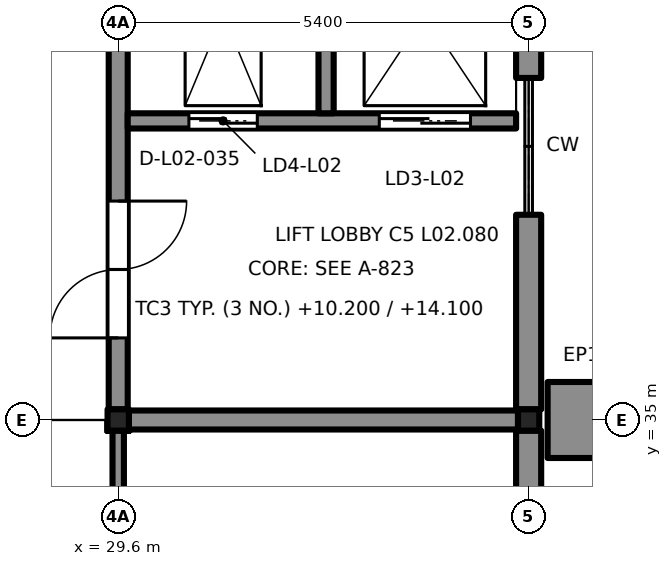
"""IFC4 building model, lengths in metres.
Left out: names, types, materials, properties, quantities, classifications, styles, units other than length and angle.
Written with IfcOpenShell. Run it as: python <this file> out.ifc"""

import sys

from ifc_helpers import new_model, si_unit, direction, frame, frame_2d, origin, origin_2d, place, context, subcontext, project, spatial, rectangle, extrude, element, fill, save


model = new_model("IFC4")
c1 = context("Model", 3, precision=1e-05, world=origin(), true_north=direction((0.0, 1.0)))
c2 = subcontext(c1, "Body", "Model", "MODEL_VIEW")
j1 = project(units=[si_unit("LENGTHUNIT", "METRE"), si_unit("PLANEANGLEUNIT", "RADIAN")], contexts=[c1])
p1 = place(None, origin())
s1 = spatial("IfcSite", under=j1, at=p1, CompositionType="ELEMENT")
p2 = place(p1, origin())
s2 = spatial("IfcBuilding", under=s1, at=p2, CompositionType="ELEMENT")
p3 = place(p2, frame((0.0, 0.0, 10.2)))
s3 = spatial("IfcBuildingStorey", under=s2, at=p3, CompositionType="ELEMENT", Elevation=10.2)
for number, where, z_axis, x_axis in (
    (1, (29.6, 35.0, 0.0), (0.0, 0.0, 1.0), (1.0, 0.0, 0.0)),
    (2, (35.0, 35.0, 0.0), (0.0, 0.0, 1.0), (1.0, 0.0, 0.0)),
):
    element("IfcColumn", number, at=place(p3, frame(where, z_axis=z_axis, x_axis=x_axis)), inside=s3, PredefinedType="COLUMN", context=c2, shape_type="SweptSolid", body=[
        extrude(rectangle(XDim=0.28, YDim=0.28, at=origin_2d()), origin(), (0.0, 0.0, 1.0), 3.9),
    ])
p4 = place(p3, frame((29.6, 35.14, 0.0), z_axis=(0.0, 0.0, 1.0), x_axis=(0.0, 1.0, 0.0)))
e3 = element("IfcWall", 3, at=p4, inside=s3, PredefinedType="SHEAR", context=c2, shape_type="SweptSolid", body=[
    extrude(rectangle(XDim=6.895, YDim=0.25, at=frame_2d((3.448, 0.0))), origin(), (0.0, 0.0, 1.0), 3.65),
])
p5 = place(p4, frame((0.94, 0.0, 0.0)))
e4 = element("IfcOpeningElement", 4, at=p5, cuts=e3, PredefinedType="OPENING", context=c2, shape_type="SweptSolid", body=[
    extrude(rectangle(XDim=1.8, YDim=2.1, at=frame_2d((0.9, 1.05))), frame((0.0, 0.135, 0.0), z_axis=(0.0, -1.0, 0.0), x_axis=(1.0, 0.0, 0.0)), (0.0, 0.0, 1.0), 0.27),
])
p6 = place(p3, frame((29.74, 35.0, 0.0), z_axis=(0.0, 0.0, 1.0), x_axis=(1.0, 0.0, 0.0)))
e5 = element("IfcWall", 5, at=p6, inside=s3, PredefinedType="SHEAR", context=c2, shape_type="SweptSolid", body=[
    extrude(rectangle(XDim=5.12, YDim=0.25, at=frame_2d((2.56, 0.0))), origin(), (0.0, 0.0, 1.0), 3.65),
])
p7 = place(p3, frame((29.725, 38.935, 0.0), z_axis=(0.0, 0.0, 1.0), x_axis=(1.0, 0.0, 0.0)))
e6 = element("IfcWall", 6, at=p7, inside=s3, PredefinedType="SHEAR", context=c2, shape_type="SweptSolid", body=[
    extrude(rectangle(XDim=5.11, YDim=0.2, at=frame_2d((2.555, 0.0))), origin(), (0.0, 0.0, 1.0), 3.65),
])
p8 = place(p7, frame((3.31, 0.0, 0.0)))
e7 = element("IfcOpeningElement", 7, at=p8, cuts=e6, PredefinedType="OPENING", context=c2, shape_type="SweptSolid", body=[
    extrude(rectangle(XDim=1.2, YDim=2.1, at=frame_2d((0.6, 1.05))), frame((0.0, 0.11, 0.0), z_axis=(0.0, -1.0, 0.0), x_axis=(1.0, 0.0, 0.0)), (0.0, 0.0, 1.0), 0.22),
])
p9 = place(p7, frame((0.805, 0.0, 0.0)))
e8 = element("IfcOpeningElement", 8, at=p9, cuts=e6, PredefinedType="OPENING", context=c2, shape_type="SweptSolid", body=[
    extrude(rectangle(XDim=0.9, YDim=2.1, at=frame_2d((0.45, 1.05))), frame((0.0, 0.11, 0.0), z_axis=(0.0, -1.0, 0.0), x_axis=(1.0, 0.0, 0.0)), (0.0, 0.0, 1.0), 0.22),
])
p10 = place(p3, frame((32.335, 42.035, 0.0), z_axis=(0.0, 0.0, 1.0), x_axis=(0.0, -1.0, 0.0)))
e9 = element("IfcWall", 9, at=p10, inside=s3, PredefinedType="SHEAR", context=c2, shape_type="SweptSolid", body=[
    extrude(rectangle(XDim=3.0, YDim=0.2, at=frame_2d((1.5, 0.0))), origin(), (0.0, 0.0, 1.0), 3.65),
])
p11 = place(p3, frame((35.0, 34.86, 0.0), z_axis=(0.0, 0.0, 1.0), x_axis=(0.0, -1.0, 0.0)))
e10 = element("IfcWall", 10, at=p11, inside=s3, PredefinedType="SOLIDWALL", context=c2, shape_type="SweptSolid", body=[
    extrude(rectangle(XDim=3.46, YDim=0.33, at=frame_2d((1.73, 0.0))), origin(), (0.0, 0.0, 1.0), 3.22),
])
p12 = place(p11, frame((1.06, 0.0, 0.9)))
e11 = element("IfcOpeningElement", 11, at=p12, cuts=e10, PredefinedType="OPENING", context=c2, shape_type="SweptSolid", body=[
    extrude(rectangle(XDim=1.2, YDim=1.5, at=frame_2d((0.6, 0.75))), frame((0.0, 0.175, 0.0), z_axis=(0.0, -1.0, 0.0), x_axis=(1.0, 0.0, 0.0)), (0.0, 0.0, 1.0), 0.35),
])
p13 = place(p3, frame((35.0, 37.7, 0.0), z_axis=(0.0, 0.0, 1.0), x_axis=(0.0, -1.0, 0.0)))
e12 = element("IfcWall", 12, at=p13, inside=s3, PredefinedType="SOLIDWALL", context=c2, shape_type="SweptSolid", body=[
    extrude(rectangle(XDim=2.56, YDim=0.33, at=frame_2d((1.28, 0.0))), origin(), (0.0, 0.0, 1.0), 3.22),
])
p14 = place(p3, frame((35.0, 42.365, 0.0), z_axis=(0.0, 0.0, 1.0), x_axis=(0.0, -1.0, 0.0)))
e13 = element("IfcWall", 13, at=p14, inside=s3, PredefinedType="SOLIDWALL", context=c2, shape_type="SweptSolid", body=[
    extrude(rectangle(XDim=2.865, YDim=0.33, at=frame_2d((1.433, 0.0))), origin(), (0.0, 0.0, 1.0), 3.22),
])
p15 = place(p3, frame((35.625, 35.5, 0.0), z_axis=(0.0, 0.0, 1.0), x_axis=(0.0, -1.0, 0.0)))
e14 = element("IfcWall", 14, at=p15, inside=s3, PredefinedType="SOLIDWALL", context=c2, shape_type="SweptSolid", body=[
    extrude(rectangle(XDim=1.0, YDim=0.75, at=frame_2d((0.5, 0.0))), origin(), (0.0, 0.0, 1.0), 3.9),
])
p16 = place(p3, frame((29.6, 34.86, 0.0), z_axis=(0.0, 0.0, 1.0), x_axis=(0.0, -1.0, 0.0)))
e15 = element("IfcWall", 15, at=p16, inside=s3, PredefinedType="PARTITIONING", context=c2, shape_type="SweptSolid", body=[
    extrude(rectangle(XDim=3.46, YDim=0.15, at=frame_2d((1.73, 0.0))), origin(), (0.0, 0.0, 1.0), 3.22),
])
p17 = place(p16, frame((1.16, 0.0, 0.0)))
e16 = element("IfcOpeningElement", 16, at=p17, cuts=e15, PredefinedType="OPENING", context=c2, shape_type="SweptSolid", body=[
    extrude(rectangle(XDim=1.0, YDim=2.1, at=frame_2d((0.5, 1.05))), frame((0.0, 0.085, 0.0), z_axis=(0.0, -1.0, 0.0), x_axis=(1.0, 0.0, 0.0)), (0.0, 0.0, 1.0), 0.17),
])
p18 = place(p5, origin())
e17 = element("IfcDoor", 17, at=p18, inside=s3, OperationType="DOUBLE_DOOR_SINGLE_SWING", PredefinedType="DOOR", context=c2, shape_type="SweptSolid", body=[
    extrude(rectangle(XDim=1.8, YDim=2.1, at=frame_2d((0.9, 1.05))), frame((0.0, 0.025, 0.0), z_axis=(0.0, -1.0, 0.0), x_axis=(1.0, 0.0, 0.0)), (0.0, 0.0, 1.0), 0.05),
])
fill(e4, e17)
p19 = place(p8, origin())
e18 = element("IfcDoor", 18, at=p19, inside=s3, OperationType="DOUBLE_DOOR_SLIDING", PredefinedType="DOOR", context=c2, shape_type="SweptSolid", body=[
    extrude(rectangle(XDim=1.2, YDim=2.1, at=frame_2d((0.6, 1.05))), frame((0.0, 0.025, 0.0), z_axis=(0.0, -1.0, 0.0), x_axis=(1.0, 0.0, 0.0)), (0.0, 0.0, 1.0), 0.05),
])
fill(e7, e18)
p20 = place(p9, origin())
e19 = element("IfcDoor", 19, at=p20, inside=s3, OperationType="DOUBLE_DOOR_SLIDING", PredefinedType="DOOR", context=c2, shape_type="SweptSolid", body=[
    extrude(rectangle(XDim=0.9, YDim=2.1, at=frame_2d((0.45, 1.05))), frame((0.0, 0.025, 0.0), z_axis=(0.0, -1.0, 0.0), x_axis=(1.0, 0.0, 0.0)), (0.0, 0.0, 1.0), 0.05),
])
fill(e8, e19)
save(model, sys.argv[1])
